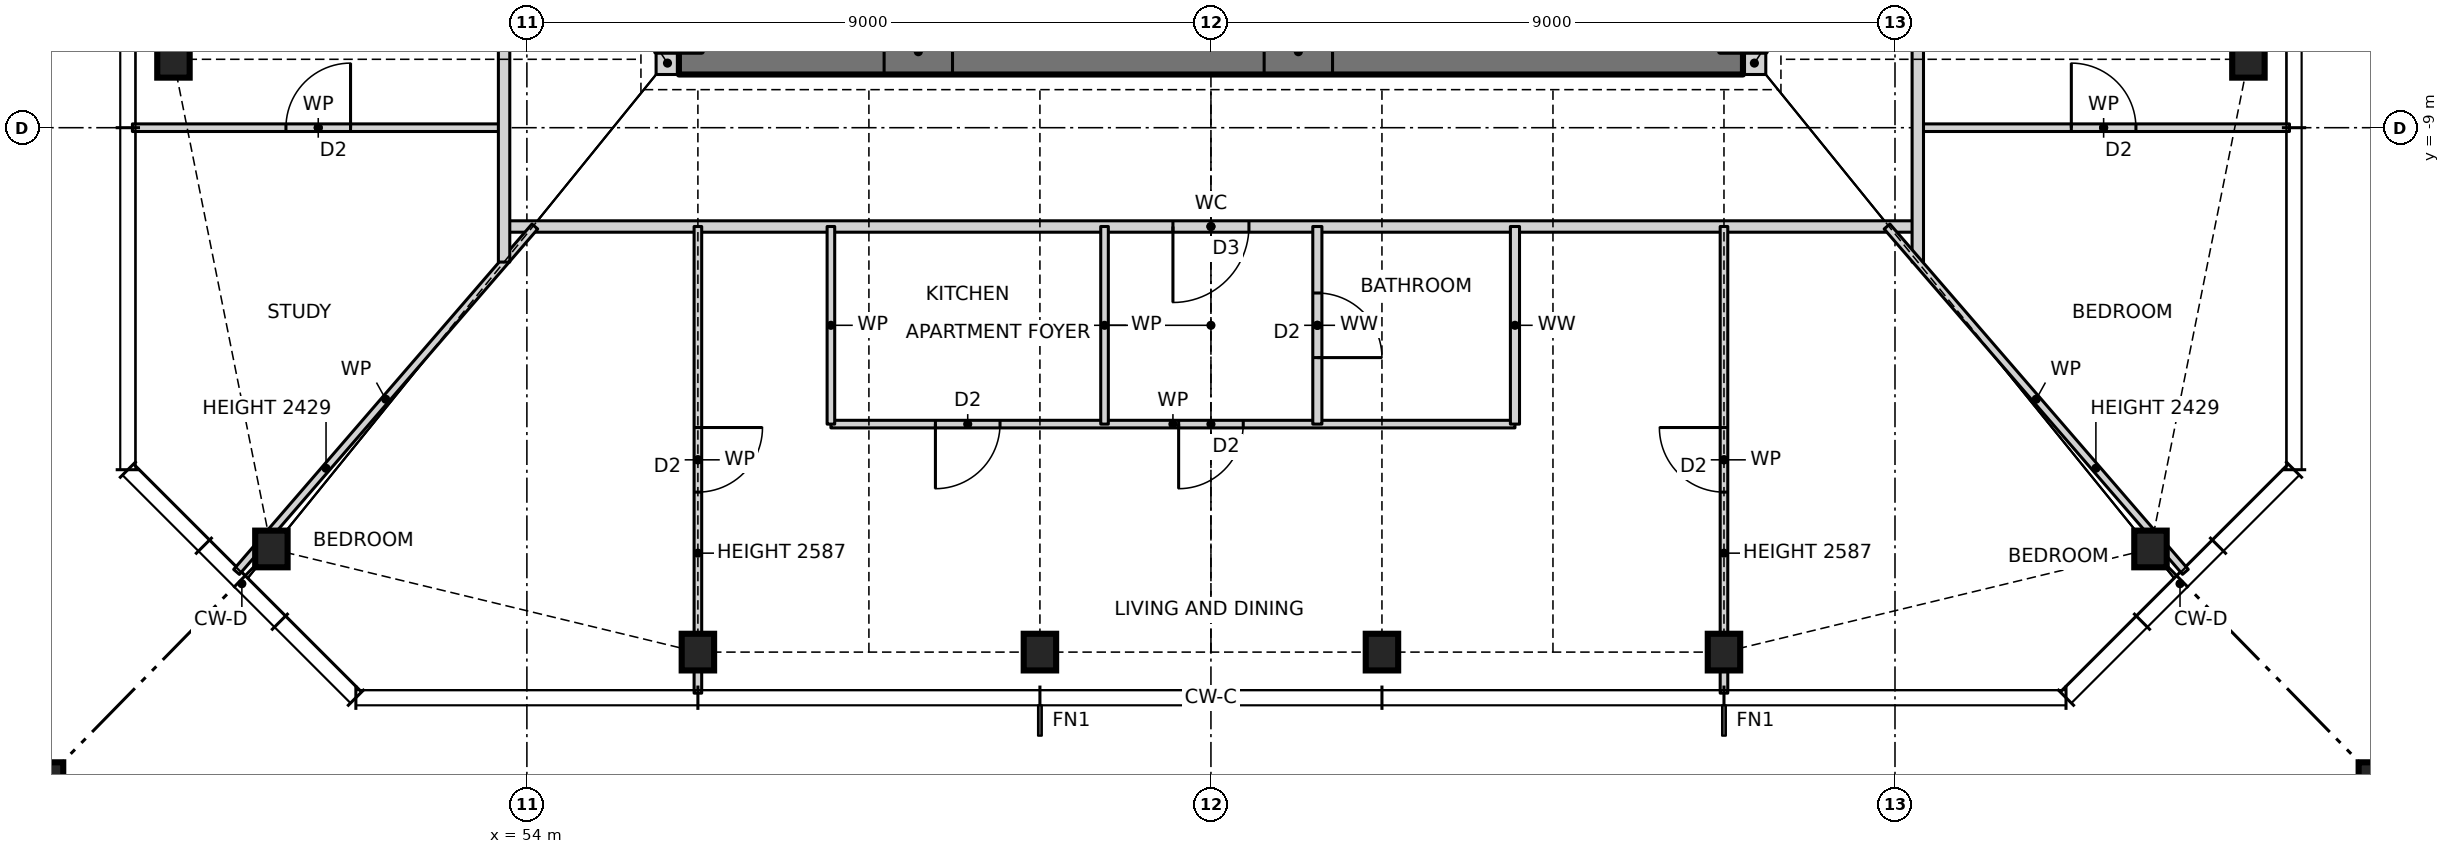
"""IFC4 building model, lengths in metres.
Left out: names, types, materials, properties, quantities, classifications, styles, units other than length and angle.
Written with IfcOpenShell. Run it as: python <this file> out.ifc"""

import sys

from ifc_helpers import new_model, si_unit, direction, frame, frame_2d, origin, origin_2d, place, context, subcontext, project, spatial, rectangle, hollow_rectangle, i_section, extrude, element, fill, save


model = new_model("IFC4")
c1 = context("Model", 3, precision=1e-05, world=origin(), true_north=direction((0.0, 1.0)))
c2 = subcontext(c1, "Body", "Model", "MODEL_VIEW")
j1 = project(units=[si_unit("LENGTHUNIT", "METRE"), si_unit("PLANEANGLEUNIT", "RADIAN")], contexts=[c1])
p1 = place(None, origin())
s1 = spatial("IfcSite", under=j1, at=p1, CompositionType="ELEMENT")
p2 = place(p1, origin())
s2 = spatial("IfcBuilding", under=s1, at=p2, CompositionType="ELEMENT")
p3 = place(p2, frame((0.0, 0.0, 112.0)))
s3 = spatial("IfcBuildingStorey", under=s2, at=p3, CompositionType="ELEMENT", Elevation=112.0)
for number, where, z_axis, x_axis in (
    (1, (50.639, -14.543, 0.0), (0.0, 0.0, 1.0), (1.0, 0.0, 0.0)),
    (2, (56.25, -15.9, 0.0), (0.0, 0.0, 1.0), (1.0, 0.0, 0.0)),
    (3, (60.75, -15.9, 0.0), (0.0, 0.0, 1.0), (1.0, 0.0, 0.0)),
    (4, (65.25, -15.9, 0.0), (0.0, 0.0, 1.0), (1.0, 0.0, 0.0)),
    (5, (69.75, -15.9, 0.0), (0.0, 0.0, 1.0), (1.0, 0.0, 0.0)),
    (6, (75.361, -14.543, 0.0), (0.0, 0.0, 1.0), (1.0, 0.0, 0.0)),
    (7, (76.65, -8.1, 0.0), (0.0, 0.0, 1.0), (1.0, 0.0, 0.0)),
    (8, (49.35, -8.1, 0.0), (0.0, 0.0, 1.0), (1.0, 0.0, 0.0)),
):
    element("IfcColumn", number, at=place(p3, frame(where, z_axis=z_axis, x_axis=x_axis)), inside=s3, PredefinedType="COLUMN", context=c2, shape_type="SweptSolid", body=[
        extrude(i_section(OverallWidth=0.427, OverallDepth=0.483, WebThickness=0.051, FlangeThickness=0.082, at=origin_2d()), origin(), (0.0, 0.0, 1.0), 3.5),
    ])
for number, where, z_axis, x_axis in (
    (9, (47.35, -17.9, 0.0), (0.0, 0.0, 1.0), (1.0, 0.0, 0.0)),
    (10, (78.65, -17.9, 0.0), (0.0, 0.0, 1.0), (1.0, 0.0, 0.0)),
):
    element("IfcColumn", number, at=place(p3, frame(where, z_axis=z_axis, x_axis=x_axis)), inside=s3, PredefinedType="COLUMN", context=c2, shape_type="SweptSolid", body=[
        extrude(hollow_rectangle(XDim=1.1, YDim=1.1, WallThickness=0.06, at=origin_2d()), origin(), (0.0, 0.0, 1.0), 3.5),
    ])
for number, where, z_axis, x_axis in (
    (11, (55.7, -8.15, 0.0), (0.0, 0.0, 1.0), (1.0, 0.0, 0.0)),
    (12, (70.0, -8.15, 0.0), (0.0, 0.0, 1.0), (1.0, 0.0, 0.0)),
):
    element("IfcWall", number, at=place(p3, frame(where, z_axis=z_axis, x_axis=x_axis)), inside=s3, PredefinedType="SOLIDWALL", context=c2, shape_type="SweptSolid", body=[
        extrude(rectangle(XDim=0.3, YDim=0.3, at=frame_2d((0.15, 0.0))), origin(), (0.0, 0.0, 1.0), 3.5),
    ])
p4 = place(p3, frame((56.0, -8.0, 0.0), z_axis=(0.0, 0.0, 1.0), x_axis=(1.0, 0.0, 0.0)))
e13 = element("IfcWall", 13, at=p4, inside=s3, PredefinedType="SHEAR", context=c2, shape_type="SweptSolid", body=[
    extrude(rectangle(XDim=14.0, YDim=0.6, at=frame_2d((7.0, 0.0))), origin(), (0.0, 0.0, 1.0), 3.5),
])
p5 = place(p4, frame((2.7, 0.0, 0.0)))
e14 = element("IfcOpeningElement", 14, at=p5, cuts=e13, PredefinedType="OPENING", context=c2, shape_type="SweptSolid", body=[
    extrude(rectangle(XDim=0.9, YDim=2.1, at=frame_2d((0.45, 1.05))), frame((0.0, 0.31, 0.0), z_axis=(0.0, -1.0, 0.0), x_axis=(1.0, 0.0, 0.0)), (0.0, 0.0, 1.0), 0.62),
])
p6 = place(p4, frame((7.7, 0.0, 0.0)))
e15 = element("IfcOpeningElement", 15, at=p6, cuts=e13, PredefinedType="OPENING", context=c2, shape_type="SweptSolid", body=[
    extrude(rectangle(XDim=0.9, YDim=2.1, at=frame_2d((0.45, 1.05))), frame((0.0, 0.31, 0.0), z_axis=(0.0, -1.0, 0.0), x_axis=(1.0, 0.0, 0.0)), (0.0, 0.0, 1.0), 0.62),
])
p7 = place(p3, frame((58.0, -12.9, 0.0), z_axis=(0.0, 0.0, 1.0), x_axis=(1.0, 0.0, 0.0)))
e16 = element("IfcWall", 16, at=p7, inside=s3, PredefinedType="PARTITIONING", context=c2, shape_type="SweptSolid", body=[
    extrude(rectangle(XDim=9.0, YDim=0.1, at=frame_2d((4.5, 0.0))), origin(), (0.0, 0.0, 1.0), 3.27),
])
p8 = place(p7, frame((1.375, 0.0, 0.0)))
e17 = element("IfcOpeningElement", 17, at=p8, cuts=e16, PredefinedType="OPENING", context=c2, shape_type="SweptSolid", body=[
    extrude(rectangle(XDim=0.85, YDim=2.1, at=frame_2d((0.425, 1.05))), frame((0.0, 0.06, 0.0), z_axis=(0.0, -1.0, 0.0), x_axis=(1.0, 0.0, 0.0)), (0.0, 0.0, 1.0), 0.12),
])
p9 = place(p7, frame((4.575, 0.0, 0.0)))
e18 = element("IfcOpeningElement", 18, at=p9, cuts=e16, PredefinedType="OPENING", context=c2, shape_type="SweptSolid", body=[
    extrude(rectangle(XDim=0.85, YDim=2.1, at=frame_2d((0.425, 1.05))), frame((0.0, 0.06, 0.0), z_axis=(0.0, -1.0, 0.0), x_axis=(1.0, 0.0, 0.0)), (0.0, 0.0, 1.0), 0.12),
])
p10 = place(p3, frame((53.7, -10.3, 0.0), z_axis=(0.0, 0.0, 1.0), x_axis=(1.0, 0.0, 0.0)))
e19 = element("IfcWall", 19, at=p10, inside=s3, PredefinedType="PARTITIONING", context=c2, shape_type="SweptSolid", body=[
    extrude(rectangle(XDim=18.6, YDim=0.15, at=frame_2d((9.3, 0.0))), origin(), (0.0, 0.0, 1.0), 3.27),
])
p11 = place(p10, frame((8.8, 0.0, 0.0)))
e20 = element("IfcOpeningElement", 20, at=p11, cuts=e19, PredefinedType="OPENING", context=c2, shape_type="SweptSolid", body=[
    extrude(rectangle(XDim=1.0, YDim=2.1, at=frame_2d((0.5, 1.05))), frame((0.0, 0.085, 0.0), z_axis=(0.0, -1.0, 0.0), x_axis=(1.0, 0.0, 0.0)), (0.0, 0.0, 1.0), 0.17),
])
p12 = place(p3, frame((48.81, -9.0, 0.0), z_axis=(0.0, 0.0, 1.0), x_axis=(1.0, 0.0, 0.0)))
e21 = element("IfcWall", 21, at=p12, inside=s3, PredefinedType="PARTITIONING", context=c2, shape_type="SweptSolid", body=[
    extrude(rectangle(XDim=4.89, YDim=0.1, at=frame_2d((2.445, 0.0))), origin(), (0.0, 0.0, 1.0), 3.27),
])
p13 = place(p12, frame((2.02, 0.0, 0.0)))
e22 = element("IfcOpeningElement", 22, at=p13, cuts=e21, PredefinedType="OPENING", context=c2, shape_type="SweptSolid", body=[
    extrude(rectangle(XDim=0.85, YDim=2.1, at=frame_2d((0.425, 1.05))), frame((0.0, 0.06, 0.0), z_axis=(0.0, -1.0, 0.0), x_axis=(1.0, 0.0, 0.0)), (0.0, 0.0, 1.0), 0.12),
])
p14 = place(p3, frame((72.3, -9.0, 0.0), z_axis=(0.0, 0.0, 1.0), x_axis=(1.0, 0.0, 0.0)))
e23 = element("IfcWall", 23, at=p14, inside=s3, PredefinedType="PARTITIONING", context=c2, shape_type="SweptSolid", body=[
    extrude(rectangle(XDim=4.89, YDim=0.1, at=frame_2d((2.445, 0.0))), origin(), (0.0, 0.0, 1.0), 3.27),
])
p15 = place(p14, frame((2.02, 0.0, 0.0)))
e24 = element("IfcOpeningElement", 24, at=p15, cuts=e23, PredefinedType="OPENING", context=c2, shape_type="SweptSolid", body=[
    extrude(rectangle(XDim=0.85, YDim=2.1, at=frame_2d((0.425, 1.05))), frame((0.0, 0.06, 0.0), z_axis=(0.0, -1.0, 0.0), x_axis=(1.0, 0.0, 0.0)), (0.0, 0.0, 1.0), 0.12),
])
p16 = place(p3, frame((50.18, -14.845, 0.0), z_axis=(0.0, 0.0, 1.0), x_axis=(0.653585997703, 0.756852260092, 0.0)))
e25 = element("IfcWall", 25, at=p16, inside=s3, PredefinedType="PARTITIONING", context=c2, shape_type="SweptSolid", body=[
    extrude(rectangle(XDim=6.005, YDim=0.1, at=frame_2d((3.002, 0.0))), origin(), (0.0, 0.0, 1.0), 2.429),
])
p17 = place(p3, frame((72.3, -10.768, 0.0), z_axis=(0.0, 0.0, 1.0), x_axis=(0.0, 1.0, 0.0)))
e26 = element("IfcWall", 26, at=p17, inside=s3, PredefinedType="PARTITIONING", context=c2, shape_type="SweptSolid", body=[
    extrude(rectangle(XDim=21.536, YDim=0.15, at=frame_2d((10.768, 0.0))), origin(), (0.0, 0.0, 1.0), 3.27),
])
p18 = place(p17, frame((10.268, 0.0, 0.0)))
e27 = element("IfcOpeningElement", 27, at=p18, cuts=e26, PredefinedType="OPENING", context=c2, shape_type="SweptSolid", body=[
    extrude(rectangle(XDim=1.0, YDim=2.1, at=frame_2d((0.5, 1.05))), frame((0.0, 0.085, 0.0), z_axis=(0.0, -1.0, 0.0), x_axis=(1.0, 0.0, 0.0)), (0.0, 0.0, 1.0), 0.17),
])
p19 = place(p3, frame((69.75, -16.44, 0.0), z_axis=(0.0, 0.0, 1.0), x_axis=(0.0, 1.0, 0.0)))
e28 = element("IfcWall", 28, at=p19, inside=s3, PredefinedType="PARTITIONING", context=c2, shape_type="SweptSolid", body=[
    extrude(rectangle(XDim=6.14, YDim=0.1, at=frame_2d((3.07, 0.0))), origin(), (0.0, 0.0, 1.0), 2.587),
])
p20 = place(p19, frame((2.645, 0.0, 0.0)))
e29 = element("IfcOpeningElement", 29, at=p20, cuts=e28, PredefinedType="OPENING", context=c2, shape_type="SweptSolid", body=[
    extrude(rectangle(XDim=0.85, YDim=2.1, at=frame_2d((0.425, 1.05))), frame((0.0, 0.06, 0.0), z_axis=(0.0, -1.0, 0.0), x_axis=(1.0, 0.0, 0.0)), (0.0, 0.0, 1.0), 0.12),
])
p21 = place(p3, frame((67.0, -12.9, 0.0), z_axis=(0.0, 0.0, 1.0), x_axis=(0.0, 1.0, 0.0)))
e30 = element("IfcWall", 30, at=p21, inside=s3, PredefinedType="PARTITIONING", context=c2, shape_type="SweptSolid", body=[
    extrude(rectangle(XDim=2.6, YDim=0.12, at=frame_2d((1.3, 0.0))), origin(), (0.0, 0.0, 1.0), 3.27),
])
p22 = place(p3, frame((64.4, -12.9, 0.0), z_axis=(0.0, 0.0, 1.0), x_axis=(0.0, 1.0, 0.0)))
e31 = element("IfcWall", 31, at=p22, inside=s3, PredefinedType="PARTITIONING", context=c2, shape_type="SweptSolid", body=[
    extrude(rectangle(XDim=2.6, YDim=0.12, at=frame_2d((1.3, 0.0))), origin(), (0.0, 0.0, 1.0), 3.27),
])
p23 = place(p22, frame((0.875, 0.0, 0.0)))
e32 = element("IfcOpeningElement", 32, at=p23, cuts=e31, PredefinedType="OPENING", context=c2, shape_type="SweptSolid", body=[
    extrude(rectangle(XDim=0.85, YDim=2.1, at=frame_2d((0.425, 1.05))), frame((0.0, 0.07, 0.0), z_axis=(0.0, -1.0, 0.0), x_axis=(1.0, 0.0, 0.0)), (0.0, 0.0, 1.0), 0.14),
])
for number, where, z_axis, x_axis in (
    (33, (61.6, -12.9, 0.0), (0.0, 0.0, 1.0), (0.0, 1.0, 0.0)),
    (34, (58.0, -12.9, 0.0), (0.0, 0.0, 1.0), (0.0, 1.0, 0.0)),
):
    element("IfcWall", number, at=place(p3, frame(where, z_axis=z_axis, x_axis=x_axis)), inside=s3, PredefinedType="PARTITIONING", context=c2, shape_type="SweptSolid", body=[
        extrude(rectangle(XDim=2.6, YDim=0.1, at=frame_2d((1.3, 0.0))), origin(), (0.0, 0.0, 1.0), 3.27),
    ])
p24 = place(p3, frame((56.25, -16.44, 0.0), z_axis=(0.0, 0.0, 1.0), x_axis=(0.0, 1.0, 0.0)))
e35 = element("IfcWall", 35, at=p24, inside=s3, PredefinedType="PARTITIONING", context=c2, shape_type="SweptSolid", body=[
    extrude(rectangle(XDim=6.14, YDim=0.1, at=frame_2d((3.07, 0.0))), origin(), (0.0, 0.0, 1.0), 2.587),
])
p25 = place(p24, frame((2.645, 0.0, 0.0)))
e36 = element("IfcOpeningElement", 36, at=p25, cuts=e35, PredefinedType="OPENING", context=c2, shape_type="SweptSolid", body=[
    extrude(rectangle(XDim=0.85, YDim=2.1, at=frame_2d((0.425, 1.05))), frame((0.0, 0.06, 0.0), z_axis=(0.0, -1.0, 0.0), x_axis=(1.0, 0.0, 0.0)), (0.0, 0.0, 1.0), 0.12),
])
p26 = place(p3, frame((53.7, -10.768, 0.0), z_axis=(0.0, 0.0, 1.0), x_axis=(0.0, 1.0, 0.0)))
e37 = element("IfcWall", 37, at=p26, inside=s3, PredefinedType="PARTITIONING", context=c2, shape_type="SweptSolid", body=[
    extrude(rectangle(XDim=21.536, YDim=0.15, at=frame_2d((10.768, 0.0))), origin(), (0.0, 0.0, 1.0), 3.27),
])
p27 = place(p26, frame((10.268, 0.0, 0.0)))
e38 = element("IfcOpeningElement", 38, at=p27, cuts=e37, PredefinedType="OPENING", context=c2, shape_type="SweptSolid", body=[
    extrude(rectangle(XDim=1.0, YDim=2.1, at=frame_2d((0.5, 1.05))), frame((0.0, 0.085, 0.0), z_axis=(0.0, -1.0, 0.0), x_axis=(1.0, 0.0, 0.0)), (0.0, 0.0, 1.0), 0.17),
])
p28 = place(p3, frame((75.821, -14.844, 0.0), z_axis=(0.0, 0.0, 1.0), x_axis=(-0.65378286253, 0.756682211144, 0.0)))
e39 = element("IfcWall", 39, at=p28, inside=s3, PredefinedType="PARTITIONING", context=c2, shape_type="SweptSolid", body=[
    extrude(rectangle(XDim=6.005, YDim=0.1, at=frame_2d((3.002, 0.0))), origin(), (0.0, 0.0, 1.0), 2.429),
])
p29 = place(p8, frame((0.85, 0.0, 0.0), z_axis=(0.0, 0.0, 1.0), x_axis=(-1.0, 0.0, 0.0)))
e40 = element("IfcDoor", 40, at=p29, inside=s3, OperationType="SINGLE_SWING_RIGHT", PredefinedType="DOOR", context=c2, shape_type="SweptSolid", body=[
    extrude(rectangle(XDim=0.85, YDim=2.1, at=frame_2d((0.425, 1.05))), frame((0.0, 0.025, 0.0), z_axis=(0.0, -1.0, 0.0), x_axis=(1.0, 0.0, 0.0)), (0.0, 0.0, 1.0), 0.05),
])
fill(e17, e40)
p30 = place(p11, frame((1.0, 0.0, 0.0), z_axis=(0.0, 0.0, 1.0), x_axis=(-1.0, 0.0, 0.0)))
e41 = element("IfcDoor", 41, at=p30, inside=s3, OperationType="SINGLE_SWING_RIGHT", PredefinedType="DOOR", context=c2, shape_type="SweptSolid", body=[
    extrude(rectangle(XDim=1.0, YDim=2.1, at=frame_2d((0.5, 1.05))), frame((0.0, 0.025, 0.0), z_axis=(0.0, -1.0, 0.0), x_axis=(1.0, 0.0, 0.0)), (0.0, 0.0, 1.0), 0.05),
])
fill(e20, e41)
p31 = place(p9, frame((0.85, 0.0, 0.0), z_axis=(0.0, 0.0, 1.0), x_axis=(-1.0, 0.0, 0.0)))
e42 = element("IfcDoor", 42, at=p31, inside=s3, OperationType="SINGLE_SWING_RIGHT", PredefinedType="DOOR", context=c2, shape_type="SweptSolid", body=[
    extrude(rectangle(XDim=0.85, YDim=2.1, at=frame_2d((0.425, 1.05))), frame((0.0, 0.025, 0.0), z_axis=(0.0, -1.0, 0.0), x_axis=(1.0, 0.0, 0.0)), (0.0, 0.0, 1.0), 0.05),
])
fill(e18, e42)
p32 = place(p23, frame((0.85, 0.0, 0.0), z_axis=(0.0, 0.0, 1.0), x_axis=(-1.0, 0.0, 0.0)))
e43 = element("IfcDoor", 43, at=p32, inside=s3, OperationType="SINGLE_SWING_RIGHT", PredefinedType="DOOR", context=c2, shape_type="SweptSolid", body=[
    extrude(rectangle(XDim=0.85, YDim=2.1, at=frame_2d((0.425, 1.05))), frame((0.0, 0.025, 0.0), z_axis=(0.0, -1.0, 0.0), x_axis=(1.0, 0.0, 0.0)), (0.0, 0.0, 1.0), 0.05),
])
fill(e32, e43)
p33 = place(p25, frame((0.85, 0.0, 0.0), z_axis=(0.0, 0.0, 1.0), x_axis=(-1.0, 0.0, 0.0)))
e44 = element("IfcDoor", 44, at=p33, inside=s3, OperationType="SINGLE_SWING_LEFT", PredefinedType="DOOR", context=c2, shape_type="SweptSolid", body=[
    extrude(rectangle(XDim=0.85, YDim=2.1, at=frame_2d((0.425, 1.05))), frame((0.0, 0.025, 0.0), z_axis=(0.0, -1.0, 0.0), x_axis=(1.0, 0.0, 0.0)), (0.0, 0.0, 1.0), 0.05),
])
fill(e36, e44)
p34 = place(p20, origin())
e45 = element("IfcDoor", 45, at=p34, inside=s3, OperationType="SINGLE_SWING_RIGHT", PredefinedType="DOOR", context=c2, shape_type="SweptSolid", body=[
    extrude(rectangle(XDim=0.85, YDim=2.1, at=frame_2d((0.425, 1.05))), frame((0.0, 0.025, 0.0), z_axis=(0.0, -1.0, 0.0), x_axis=(1.0, 0.0, 0.0)), (0.0, 0.0, 1.0), 0.05),
])
fill(e29, e45)
p35 = place(p15, origin())
e46 = element("IfcDoor", 46, at=p35, inside=s3, OperationType="SINGLE_SWING_LEFT", PredefinedType="DOOR", context=c2, shape_type="SweptSolid", body=[
    extrude(rectangle(XDim=0.85, YDim=2.1, at=frame_2d((0.425, 1.05))), frame((0.0, 0.025, 0.0), z_axis=(0.0, -1.0, 0.0), x_axis=(1.0, 0.0, 0.0)), (0.0, 0.0, 1.0), 0.05),
])
fill(e24, e46)
p36 = place(p13, origin())
e47 = element("IfcDoor", 47, at=p36, inside=s3, OperationType="SINGLE_SWING_RIGHT", PredefinedType="DOOR", context=c2, shape_type="SweptSolid", body=[
    extrude(rectangle(XDim=0.85, YDim=2.1, at=frame_2d((0.425, 1.05))), frame((0.0, 0.025, 0.0), z_axis=(0.0, -1.0, 0.0), x_axis=(1.0, 0.0, 0.0)), (0.0, 0.0, 1.0), 0.05),
])
fill(e22, e47)
p37 = place(p5, origin())
e48 = element("IfcDoor", 48, at=p37, inside=s3, OperationType="SINGLE_SWING_LEFT", PredefinedType="DOOR", context=c2, shape_type="SweptSolid", body=[
    extrude(rectangle(XDim=0.9, YDim=2.1, at=frame_2d((0.45, 1.05))), frame((0.0, 0.025, 0.0), z_axis=(0.0, -1.0, 0.0), x_axis=(1.0, 0.0, 0.0)), (0.0, 0.0, 1.0), 0.05),
])
fill(e14, e48)
p38 = place(p6, origin())
e49 = element("IfcDoor", 49, at=p38, inside=s3, OperationType="SINGLE_SWING_LEFT", PredefinedType="DOOR", context=c2, shape_type="SweptSolid", body=[
    extrude(rectangle(XDim=0.9, YDim=2.1, at=frame_2d((0.45, 1.05))), frame((0.0, 0.025, 0.0), z_axis=(0.0, -1.0, 0.0), x_axis=(1.0, 0.0, 0.0)), (0.0, 0.0, 1.0), 0.05),
])
fill(e15, e49)
save(model, sys.argv[1])
